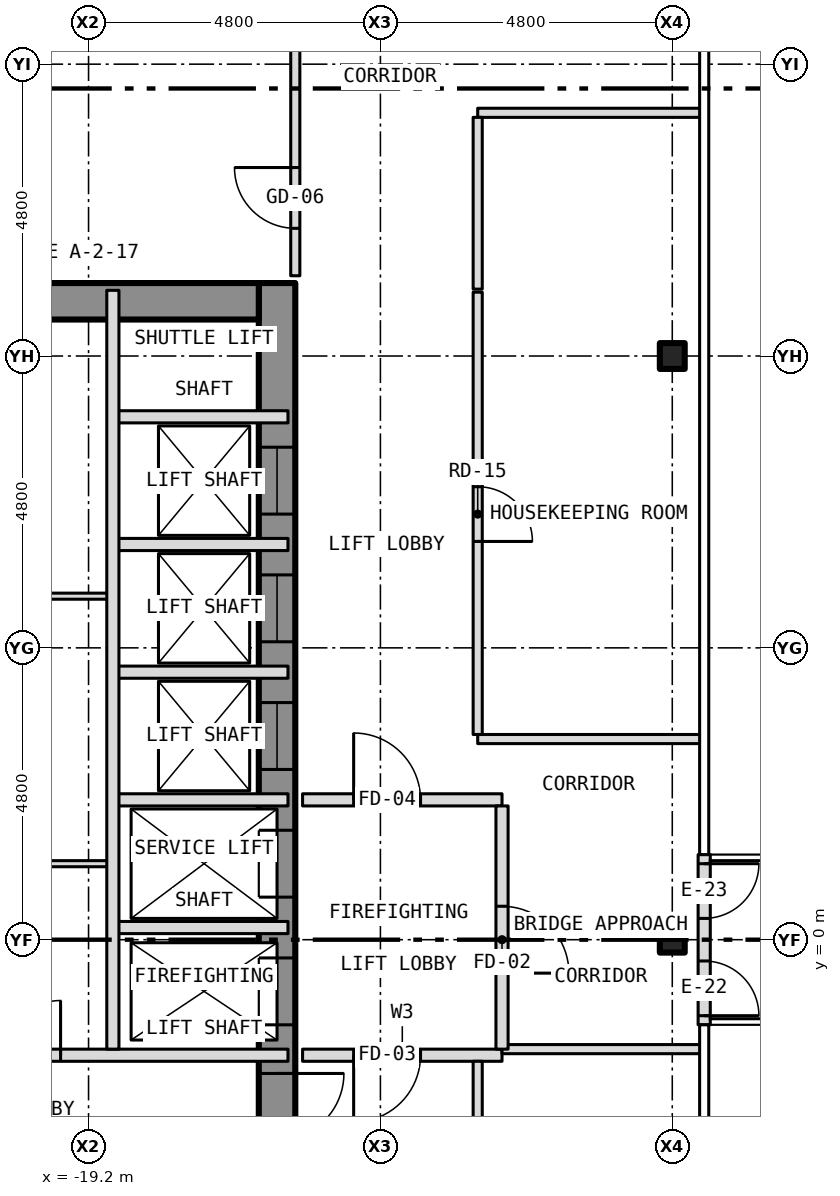
"""IFC4 building model, lengths in metres.
Left out: names, types, materials, properties, quantities, classifications, styles, units other than length and angle.
Written with IfcOpenShell. Run it as: python <this file> out.ifc"""

import sys

from ifc_helpers import new_model, si_unit, direction, frame, frame_2d, origin, origin_2d, place, context, subcontext, project, spatial, rectangle, i_section, extrude, element, fill, save


model = new_model("IFC4")
c1 = context("Model", 3, precision=1e-05, world=origin(), true_north=direction((0.0, 1.0)))
c2 = subcontext(c1, "Body", "Model", "MODEL_VIEW")
j1 = project(units=[si_unit("LENGTHUNIT", "METRE"), si_unit("PLANEANGLEUNIT", "RADIAN")], contexts=[c1])
p1 = place(None, origin())
s1 = spatial("IfcSite", under=j1, at=p1, CompositionType="ELEMENT")
p2 = place(p1, origin())
s2 = spatial("IfcBuilding", under=s1, at=p2, CompositionType="ELEMENT")
p3 = place(p2, frame((0.0, 0.0, 63.5)))
s3 = spatial("IfcBuildingStorey", under=s2, at=p3, CompositionType="ELEMENT", Elevation=63.5)
for number, where, z_axis, x_axis in (
    (1, (-9.6, 0.0, -0.15), (0.0, 0.0, 1.0), (1.0, 0.0, 0.0)),
    (2, (-9.6, 9.6, -0.15), (0.0, 0.0, 1.0), (1.0, 0.0, 0.0)),
):
    element("IfcColumn", number, at=place(p3, frame(where, z_axis=z_axis, x_axis=x_axis)), inside=s3, PredefinedType="COLUMN", context=c2, shape_type="SweptSolid", body=[
        extrude(i_section(OverallWidth=0.409, OverallDepth=0.424, WebThickness=0.033, FlangeThickness=0.052, at=origin_2d()), origin(), (0.0, 0.0, 1.0), 3.5),
    ])
p4 = place(p3, frame((-16.1, -10.8, 0.0), z_axis=(0.0, 0.0, 1.0), x_axis=(0.0, 1.0, 0.0)))
e3 = element("IfcWall", 3, at=p4, inside=s3, PredefinedType="SHEAR", context=c2, shape_type="SweptSolid", body=[
    extrude(rectangle(XDim=21.6, YDim=0.6, at=frame_2d((10.8, 0.0))), origin(), (0.0, 0.0, 1.0), 3.25),
])
p5 = place(p4, frame((9.4, 0.0, 0.0)))
e4 = element("IfcOpeningElement", 4, at=p5, cuts=e3, PredefinedType="OPENING", context=c2, shape_type="SweptSolid", body=[
    extrude(rectangle(XDim=1.1, YDim=2.1, at=frame_2d((0.55, 1.05))), frame((0.0, 0.312, 0.0), z_axis=(0.0, -1.0, 0.0), x_axis=(1.0, 0.0, 0.0)), (0.0, 0.0, 1.0), 0.624),
])
p6 = place(p4, frame((11.5, 0.0, 0.0)))
e5 = element("IfcOpeningElement", 5, at=p6, cuts=e3, PredefinedType="OPENING", context=c2, shape_type="SweptSolid", body=[
    extrude(rectangle(XDim=1.1, YDim=2.1, at=frame_2d((0.55, 1.05))), frame((0.0, 0.312, 0.0), z_axis=(0.0, -1.0, 0.0), x_axis=(1.0, 0.0, 0.0)), (0.0, 0.0, 1.0), 0.624),
])
p7 = place(p4, frame((13.6, 0.0, 0.0)))
e6 = element("IfcOpeningElement", 6, at=p7, cuts=e3, PredefinedType="OPENING", context=c2, shape_type="SweptSolid", body=[
    extrude(rectangle(XDim=1.1, YDim=2.1, at=frame_2d((0.55, 1.05))), frame((0.0, 0.312, 0.0), z_axis=(0.0, -1.0, 0.0), x_axis=(1.0, 0.0, 0.0)), (0.0, 0.0, 1.0), 0.624),
])
p8 = place(p4, frame((15.7, 0.0, 0.0)))
e7 = element("IfcOpeningElement", 7, at=p8, cuts=e3, PredefinedType="OPENING", context=c2, shape_type="SweptSolid", body=[
    extrude(rectangle(XDim=1.1, YDim=2.1, at=frame_2d((0.55, 1.05))), frame((0.0, 0.312, 0.0), z_axis=(0.0, -1.0, 0.0), x_axis=(1.0, 0.0, 0.0)), (0.0, 0.0, 1.0), 0.624),
])
p9 = place(p4, frame((17.8, 0.0, 0.0)))
e8 = element("IfcOpeningElement", 8, at=p9, cuts=e3, PredefinedType="OPENING", context=c2, shape_type="SweptSolid", body=[
    extrude(rectangle(XDim=1.1, YDim=2.1, at=frame_2d((0.55, 1.05))), frame((0.0, 0.312, 0.0), z_axis=(0.0, -1.0, 0.0), x_axis=(1.0, 0.0, 0.0)), (0.0, 0.0, 1.0), 0.624),
])
p10 = place(p4, frame((0.758, 0.0, 0.0)))
e9 = element("IfcOpeningElement", 9, at=p10, cuts=e3, PredefinedType="OPENING", context=c2, shape_type="SweptSolid", body=[
    extrude(rectangle(XDim=1.1, YDim=2.1, at=frame_2d((0.55, 1.05))), frame((0.0, 0.312, 0.0), z_axis=(0.0, -1.0, 0.0), x_axis=(1.0, 0.0, 0.0)), (0.0, 0.0, 1.0), 0.624),
])
p11 = place(p4, frame((7.5, 0.0, 0.0)))
e10 = element("IfcOpeningElement", 10, at=p11, cuts=e3, PredefinedType="OPENING", context=c2, shape_type="SweptSolid", body=[
    extrude(rectangle(XDim=1.1, YDim=2.1, at=frame_2d((0.55, 1.05))), frame((0.0, 0.312, 0.0), z_axis=(0.0, -1.0, 0.0), x_axis=(1.0, 0.0, 0.0)), (0.0, 0.0, 1.0), 0.624),
])
p12 = place(p3, frame((-23.4, 10.5, 0.0), z_axis=(0.0, 0.0, 1.0), x_axis=(1.0, 0.0, 0.0)))
e11 = element("IfcWall", 11, at=p12, inside=s3, PredefinedType="SHEAR", context=c2, shape_type="SweptSolid", body=[
    extrude(rectangle(XDim=7.0, YDim=0.6, at=frame_2d((3.5, 0.0))), origin(), (0.0, 0.0, 1.0), 3.25),
])
p13 = place(p3, frame((-9.075, -1.4, 0.0), z_axis=(0.0, 0.0, 1.0), x_axis=(0.0, 1.0, 0.0)))
e12 = element("IfcWall", 12, at=p13, inside=s3, PredefinedType="SOLIDWALL", context=c2, shape_type="SweptSolid", body=[
    extrude(rectangle(XDim=2.8, YDim=0.2, at=frame_2d((1.4, 0.0))), origin(), (0.0, 0.0, 1.0), 3.5),
])
p14 = place(p13, frame((0.15, 0.0, 0.0)))
e13 = element("IfcOpeningElement", 13, at=p14, cuts=e12, PredefinedType="OPENING", context=c2, shape_type="SweptSolid", body=[
    extrude(rectangle(XDim=0.9, YDim=2.1, at=frame_2d((0.45, 1.05))), frame((0.0, 0.112, 0.0), z_axis=(0.0, -1.0, 0.0), x_axis=(1.0, 0.0, 0.0)), (0.0, 0.0, 1.0), 0.224),
])
p15 = place(p13, frame((1.75, 0.0, 0.0)))
e14 = element("IfcOpeningElement", 14, at=p15, cuts=e12, PredefinedType="OPENING", context=c2, shape_type="SweptSolid", body=[
    extrude(rectangle(XDim=0.9, YDim=2.1, at=frame_2d((0.45, 1.05))), frame((0.0, 0.112, 0.0), z_axis=(0.0, -1.0, 0.0), x_axis=(1.0, 0.0, 0.0)), (0.0, 0.0, 1.0), 0.224),
])
p16 = place(p3, frame((-23.88, -1.9, 0.0), z_axis=(0.0, 0.0, 1.0), x_axis=(1.0, 0.0, 0.0)))
e15 = element("IfcWall", 15, at=p16, inside=s3, PredefinedType="PARTITIONING", context=c2, shape_type="SweptSolid", body=[
    extrude(rectangle(XDim=7.96, YDim=0.2, at=frame_2d((3.98, 0.0))), origin(), (0.0, 0.0, 1.0), 3.25),
])
p17 = place(p16, frame((3.32, 0.0, 0.0)))
e16 = element("IfcOpeningElement", 16, at=p17, cuts=e15, PredefinedType="OPENING", context=c2, shape_type="SweptSolid", body=[
    extrude(rectangle(XDim=0.9, YDim=2.1, at=frame_2d((0.45, 1.05))), frame((0.0, 0.112, 0.0), z_axis=(0.0, -1.0, 0.0), x_axis=(1.0, 0.0, 0.0)), (0.0, 0.0, 1.0), 0.224),
])
p18 = place(p3, frame((-15.68, -1.9, 0.0), z_axis=(0.0, 0.0, 1.0), x_axis=(1.0, 0.0, 0.0)))
e17 = element("IfcWall", 17, at=p18, inside=s3, PredefinedType="PARTITIONING", context=c2, shape_type="SweptSolid", body=[
    extrude(rectangle(XDim=3.28, YDim=0.2, at=frame_2d((1.64, 0.0))), origin(), (0.0, 0.0, 1.0), 3.35),
])
p19 = place(p18, frame((0.84, 0.0, 0.0)))
e18 = element("IfcOpeningElement", 18, at=p19, cuts=e17, PredefinedType="OPENING", context=c2, shape_type="SweptSolid", body=[
    extrude(rectangle(XDim=1.1, YDim=2.1, at=frame_2d((0.55, 1.05))), frame((0.0, 0.112, 0.0), z_axis=(0.0, -1.0, 0.0), x_axis=(1.0, 0.0, 0.0)), (0.0, 0.0, 1.0), 0.224),
])
p20 = place(p3, frame((-12.4, -1.8, 0.0), z_axis=(0.0, 0.0, 1.0), x_axis=(1.0, 0.0, 0.0)))
e19 = element("IfcWall", 19, at=p20, inside=s3, PredefinedType="PARTITIONING", context=c2, shape_type="SweptSolid", body=[
    extrude(rectangle(XDim=3.28, YDim=0.15, at=frame_2d((1.64, 0.0))), origin(), (0.0, 0.0, 1.0), 3.35),
])
p21 = place(p3, frame((-18.8, 0.2, 0.0), z_axis=(0.0, 0.0, 1.0), x_axis=(1.0, 0.0, 0.0)))
e20 = element("IfcWall", 20, at=p21, inside=s3, PredefinedType="PARTITIONING", context=c2, shape_type="SweptSolid", body=[
    extrude(rectangle(XDim=2.88, YDim=0.2, at=frame_2d((1.44, 0.0))), origin(), (0.0, 0.0, 1.0), 3.25),
])
p22 = place(p3, frame((-23.88, 1.25, 0.0), z_axis=(0.0, 0.0, 1.0), x_axis=(1.0, 0.0, 0.0)))
e21 = element("IfcWall", 21, at=p22, inside=s3, PredefinedType="PARTITIONING", context=c2, shape_type="SweptSolid", body=[
    extrude(rectangle(XDim=5.08, YDim=0.1, at=frame_2d((2.54, 0.0))), origin(), (0.0, 0.0, 1.0), 3.25),
])
p23 = place(p22, frame((2.03, 0.0, 0.0)))
e22 = element("IfcOpeningElement", 22, at=p23, cuts=e21, PredefinedType="OPENING", context=c2, shape_type="SweptSolid", body=[
    extrude(rectangle(XDim=0.9, YDim=2.1, at=frame_2d((0.45, 1.05))), frame((0.0, 0.062, 0.0), z_axis=(0.0, -1.0, 0.0), x_axis=(1.0, 0.0, 0.0)), (0.0, 0.0, 1.0), 0.124),
])
p24 = place(p3, frame((-18.8, 2.3, 0.0), z_axis=(0.0, 0.0, 1.0), x_axis=(1.0, 0.0, 0.0)))
e23 = element("IfcWall", 23, at=p24, inside=s3, PredefinedType="PARTITIONING", context=c2, shape_type="SweptSolid", body=[
    extrude(rectangle(XDim=2.88, YDim=0.2, at=frame_2d((1.44, 0.0))), origin(), (0.0, 0.0, 1.0), 3.25),
])
p25 = place(p3, frame((-15.68, 2.3, 0.0), z_axis=(0.0, 0.0, 1.0), x_axis=(1.0, 0.0, 0.0)))
e24 = element("IfcWall", 24, at=p25, inside=s3, PredefinedType="PARTITIONING", context=c2, shape_type="SweptSolid", body=[
    extrude(rectangle(XDim=3.28, YDim=0.2, at=frame_2d((1.64, 0.0))), origin(), (0.0, 0.0, 1.0), 3.35),
])
p26 = place(p25, frame((0.84, 0.0, 0.0)))
e25 = element("IfcOpeningElement", 25, at=p26, cuts=e24, PredefinedType="OPENING", context=c2, shape_type="SweptSolid", body=[
    extrude(rectangle(XDim=1.1, YDim=2.1, at=frame_2d((0.55, 1.05))), frame((0.0, 0.112, 0.0), z_axis=(0.0, -1.0, 0.0), x_axis=(1.0, 0.0, 0.0)), (0.0, 0.0, 1.0), 0.224),
])
p27 = place(p3, frame((-12.8, 3.3, 0.0), z_axis=(0.0, 0.0, 1.0), x_axis=(1.0, 0.0, 0.0)))
e26 = element("IfcWall", 26, at=p27, inside=s3, PredefinedType="PARTITIONING", context=c2, shape_type="SweptSolid", body=[
    extrude(rectangle(XDim=3.68, YDim=0.15, at=frame_2d((1.84, 0.0))), origin(), (0.0, 0.0, 1.0), 3.35),
])
p28 = place(p3, frame((-18.8, 4.4, 0.0), z_axis=(0.0, 0.0, 1.0), x_axis=(1.0, 0.0, 0.0)))
e27 = element("IfcWall", 27, at=p28, inside=s3, PredefinedType="PARTITIONING", context=c2, shape_type="SweptSolid", body=[
    extrude(rectangle(XDim=2.88, YDim=0.2, at=frame_2d((1.44, 0.0))), origin(), (0.0, 0.0, 1.0), 3.25),
])
p29 = place(p3, frame((-23.88, 5.65, 0.0), z_axis=(0.0, 0.0, 1.0), x_axis=(1.0, 0.0, 0.0)))
e28 = element("IfcWall", 28, at=p29, inside=s3, PredefinedType="PARTITIONING", context=c2, shape_type="SweptSolid", body=[
    extrude(rectangle(XDim=5.08, YDim=0.1, at=frame_2d((2.54, 0.0))), origin(), (0.0, 0.0, 1.0), 3.25),
])
p30 = place(p29, frame((2.03, 0.0, 0.0)))
e29 = element("IfcOpeningElement", 29, at=p30, cuts=e28, PredefinedType="OPENING", context=c2, shape_type="SweptSolid", body=[
    extrude(rectangle(XDim=0.9, YDim=2.1, at=frame_2d((0.45, 1.05))), frame((0.0, 0.062, 0.0), z_axis=(0.0, -1.0, 0.0), x_axis=(1.0, 0.0, 0.0)), (0.0, 0.0, 1.0), 0.124),
])
for number, where, z_axis, x_axis in (
    (30, (-18.8, 6.5, 0.0), (0.0, 0.0, 1.0), (1.0, 0.0, 0.0)),
    (31, (-18.8, 8.6, 0.0), (0.0, 0.0, 1.0), (1.0, 0.0, 0.0)),
):
    element("IfcWall", number, at=place(p3, frame(where, z_axis=z_axis, x_axis=x_axis)), inside=s3, PredefinedType="PARTITIONING", context=c2, shape_type="SweptSolid", body=[
        extrude(rectangle(XDim=2.88, YDim=0.2, at=frame_2d((1.44, 0.0))), origin(), (0.0, 0.0, 1.0), 3.25),
    ])
p31 = place(p3, frame((-12.8, 13.6, 0.0), z_axis=(0.0, 0.0, 1.0), x_axis=(1.0, 0.0, 0.0)))
e32 = element("IfcWall", 32, at=p31, inside=s3, PredefinedType="PARTITIONING", context=c2, shape_type="SweptSolid", body=[
    extrude(rectangle(XDim=3.68, YDim=0.15, at=frame_2d((1.84, 0.0))), origin(), (0.0, 0.0, 1.0), 3.35),
])
p32 = place(p3, frame((-18.8, -1.8, 0.0), z_axis=(0.0, 0.0, 1.0), x_axis=(0.0, 1.0, 0.0)))
e33 = element("IfcWall", 33, at=p32, inside=s3, PredefinedType="PARTITIONING", context=c2, shape_type="SweptSolid", body=[
    extrude(rectangle(XDim=12.48, YDim=0.2, at=frame_2d((6.24, 0.0))), origin(), (0.0, 0.0, 1.0), 3.25),
])
p33 = place(p3, frame((-15.8, 10.92, 0.0), z_axis=(0.0, 0.0, 1.0), x_axis=(0.0, 1.0, 0.0)))
e34 = element("IfcWall", 34, at=p33, inside=s3, PredefinedType="PARTITIONING", context=c2, shape_type="SweptSolid", body=[
    extrude(rectangle(XDim=4.805, YDim=0.15, at=frame_2d((2.403, 0.0))), origin(), (0.0, 0.0, 1.0), 3.35),
])
p34 = place(p33, frame((0.78, 0.0, 0.0)))
e35 = element("IfcOpeningElement", 35, at=p34, cuts=e34, PredefinedType="OPENING", context=c2, shape_type="SweptSolid", body=[
    extrude(rectangle(XDim=1.0, YDim=2.1, at=frame_2d((0.5, 1.05))), frame((0.0, 0.087, 0.0), z_axis=(0.0, -1.0, 0.0), x_axis=(1.0, 0.0, 0.0)), (0.0, 0.0, 1.0), 0.174),
])
p35 = place(p3, frame((-12.8, -13.525, 0.0), z_axis=(0.0, 0.0, 1.0), x_axis=(0.0, 1.0, 0.0)))
e36 = element("IfcWall", 36, at=p35, inside=s3, PredefinedType="PARTITIONING", context=c2, shape_type="SweptSolid", body=[
    extrude(rectangle(XDim=11.525, YDim=0.15, at=frame_2d((5.762, 0.0))), origin(), (0.0, 0.0, 1.0), 3.35),
])
p36 = place(p35, frame((6.725, 0.0, 0.0)))
e37 = element("IfcOpeningElement", 37, at=p36, cuts=e36, PredefinedType="OPENING", context=c2, shape_type="SweptSolid", body=[
    extrude(rectangle(XDim=0.9, YDim=2.1, at=frame_2d((0.45, 1.05))), frame((0.0, 0.087, 0.0), z_axis=(0.0, -1.0, 0.0), x_axis=(1.0, 0.0, 0.0)), (0.0, 0.0, 1.0), 0.174),
])
p37 = place(p3, frame((-12.8, 3.375, 0.0), z_axis=(0.0, 0.0, 1.0), x_axis=(0.0, 1.0, 0.0)))
e38 = element("IfcWall", 38, at=p37, inside=s3, PredefinedType="PARTITIONING", context=c2, shape_type="SweptSolid", body=[
    extrude(rectangle(XDim=7.275, YDim=0.15, at=frame_2d((3.637, 0.0))), origin(), (0.0, 0.0, 1.0), 3.35),
])
p38 = place(p37, frame((3.175, 0.0, 0.0)))
e39 = element("IfcOpeningElement", 39, at=p38, cuts=e38, PredefinedType="OPENING", context=c2, shape_type="SweptSolid", body=[
    extrude(rectangle(XDim=0.9, YDim=2.1, at=frame_2d((0.45, 1.05))), frame((0.0, 0.087, 0.0), z_axis=(0.0, -1.0, 0.0), x_axis=(1.0, 0.0, 0.0)), (0.0, 0.0, 1.0), 0.174),
])
p39 = place(p3, frame((-12.8, 10.7, 0.0), z_axis=(0.0, 0.0, 1.0), x_axis=(0.0, 1.0, 0.0)))
e40 = element("IfcWall", 40, at=p39, inside=s3, PredefinedType="PARTITIONING", context=c2, shape_type="SweptSolid", body=[
    extrude(rectangle(XDim=2.825, YDim=0.15, at=frame_2d((1.413, 0.0))), origin(), (0.0, 0.0, 1.0), 3.35),
])
p40 = place(p3, frame((-12.4, -1.8, 0.0), z_axis=(0.0, 0.0, 1.0), x_axis=(0.0, 1.0, 0.0)))
e41 = element("IfcWall", 41, at=p40, inside=s3, PredefinedType="PARTITIONING", context=c2, shape_type="SweptSolid", body=[
    extrude(rectangle(XDim=4.0, YDim=0.2, at=frame_2d((2.0, 0.0))), origin(), (0.0, 0.0, 1.0), 3.35),
])
p41 = place(p40, frame((1.25, 0.0, 0.0)))
e42 = element("IfcOpeningElement", 42, at=p41, cuts=e41, PredefinedType="OPENING", context=c2, shape_type="SweptSolid", body=[
    extrude(rectangle(XDim=1.1, YDim=2.1, at=frame_2d((0.55, 1.05))), frame((0.0, 0.112, 0.0), z_axis=(0.0, -1.0, 0.0), x_axis=(1.0, 0.0, 0.0)), (0.0, 0.0, 1.0), 0.224),
])
p42 = place(p14, origin())
e43 = element("IfcDoor", 43, at=p42, inside=s3, OperationType="SINGLE_SWING_LEFT", PredefinedType="DOOR", context=c2, shape_type="SweptSolid", body=[
    extrude(rectangle(XDim=0.9, YDim=2.1, at=frame_2d((0.45, 1.05))), frame((0.0, 0.025, 0.0), z_axis=(0.0, -1.0, 0.0), x_axis=(1.0, 0.0, 0.0)), (0.0, 0.0, 1.0), 0.05),
])
fill(e13, e43)
p43 = place(p15, origin())
e44 = element("IfcDoor", 44, at=p43, inside=s3, OperationType="SINGLE_SWING_RIGHT", PredefinedType="DOOR", context=c2, shape_type="SweptSolid", body=[
    extrude(rectangle(XDim=0.9, YDim=2.1, at=frame_2d((0.45, 1.05))), frame((0.0, 0.025, 0.0), z_axis=(0.0, -1.0, 0.0), x_axis=(1.0, 0.0, 0.0)), (0.0, 0.0, 1.0), 0.05),
])
fill(e14, e44)
p44 = place(p5, origin())
e45 = element("IfcDoor", 45, at=p44, inside=s3, OperationType="SLIDING_TO_LEFT", PredefinedType="DOOR", context=c2, shape_type="SweptSolid", body=[
    extrude(rectangle(XDim=1.1, YDim=2.1, at=frame_2d((0.55, 1.05))), frame((0.0, 0.025, 0.0), z_axis=(0.0, -1.0, 0.0), x_axis=(1.0, 0.0, 0.0)), (0.0, 0.0, 1.0), 0.05),
])
fill(e4, e45)
p45 = place(p6, origin())
e46 = element("IfcDoor", 46, at=p45, inside=s3, OperationType="SLIDING_TO_LEFT", PredefinedType="DOOR", context=c2, shape_type="SweptSolid", body=[
    extrude(rectangle(XDim=1.1, YDim=2.1, at=frame_2d((0.55, 1.05))), frame((0.0, 0.025, 0.0), z_axis=(0.0, -1.0, 0.0), x_axis=(1.0, 0.0, 0.0)), (0.0, 0.0, 1.0), 0.05),
])
fill(e5, e46)
p46 = place(p7, origin())
e47 = element("IfcDoor", 47, at=p46, inside=s3, OperationType="SLIDING_TO_LEFT", PredefinedType="DOOR", context=c2, shape_type="SweptSolid", body=[
    extrude(rectangle(XDim=1.1, YDim=2.1, at=frame_2d((0.55, 1.05))), frame((0.0, 0.025, 0.0), z_axis=(0.0, -1.0, 0.0), x_axis=(1.0, 0.0, 0.0)), (0.0, 0.0, 1.0), 0.05),
])
fill(e6, e47)
p47 = place(p8, origin())
e48 = element("IfcDoor", 48, at=p47, inside=s3, OperationType="SLIDING_TO_LEFT", PredefinedType="DOOR", context=c2, shape_type="SweptSolid", body=[
    extrude(rectangle(XDim=1.1, YDim=2.1, at=frame_2d((0.55, 1.05))), frame((0.0, 0.025, 0.0), z_axis=(0.0, -1.0, 0.0), x_axis=(1.0, 0.0, 0.0)), (0.0, 0.0, 1.0), 0.05),
])
fill(e7, e48)
p48 = place(p9, origin())
e49 = element("IfcDoor", 49, at=p48, inside=s3, OperationType="SLIDING_TO_LEFT", PredefinedType="DOOR", context=c2, shape_type="SweptSolid", body=[
    extrude(rectangle(XDim=1.1, YDim=2.1, at=frame_2d((0.55, 1.05))), frame((0.0, 0.025, 0.0), z_axis=(0.0, -1.0, 0.0), x_axis=(1.0, 0.0, 0.0)), (0.0, 0.0, 1.0), 0.05),
])
fill(e8, e49)
p49 = place(p11, origin())
e50 = element("IfcDoor", 50, at=p49, inside=s3, OperationType="SINGLE_SWING_RIGHT", PredefinedType="DOOR", context=c2, shape_type="SweptSolid", body=[
    extrude(rectangle(XDim=1.1, YDim=2.1, at=frame_2d((0.55, 1.05))), frame((0.0, 0.025, 0.0), z_axis=(0.0, -1.0, 0.0), x_axis=(1.0, 0.0, 0.0)), (0.0, 0.0, 1.0), 0.05),
])
fill(e10, e50)
p50 = place(p17, origin())
e51 = element("IfcDoor", 51, at=p50, inside=s3, OperationType="SINGLE_SWING_RIGHT", PredefinedType="DOOR", context=c2, shape_type="SweptSolid", body=[
    extrude(rectangle(XDim=0.9, YDim=2.1, at=frame_2d((0.45, 1.05))), frame((0.0, 0.025, 0.0), z_axis=(0.0, -1.0, 0.0), x_axis=(1.0, 0.0, 0.0)), (0.0, 0.0, 1.0), 0.05),
])
fill(e16, e51)
p51 = place(p41, origin())
e52 = element("IfcDoor", 52, at=p51, inside=s3, OperationType="SINGLE_SWING_LEFT", PredefinedType="DOOR", context=c2, shape_type="SweptSolid", body=[
    extrude(rectangle(XDim=1.1, YDim=2.1, at=frame_2d((0.55, 1.05))), frame((0.0, 0.025, 0.0), z_axis=(0.0, -1.0, 0.0), x_axis=(1.0, 0.0, 0.0)), (0.0, 0.0, 1.0), 0.05),
])
fill(e42, e52)
p52 = place(p19, origin())
e53 = element("IfcDoor", 53, at=p52, inside=s3, OperationType="SINGLE_SWING_LEFT", PredefinedType="DOOR", context=c2, shape_type="SweptSolid", body=[
    extrude(rectangle(XDim=1.1, YDim=2.1, at=frame_2d((0.55, 1.05))), frame((0.0, 0.025, 0.0), z_axis=(0.0, -1.0, 0.0), x_axis=(1.0, 0.0, 0.0)), (0.0, 0.0, 1.0), 0.05),
])
fill(e18, e53)
p53 = place(p26, origin())
e54 = element("IfcDoor", 54, at=p53, inside=s3, OperationType="SINGLE_SWING_LEFT", PredefinedType="DOOR", context=c2, shape_type="SweptSolid", body=[
    extrude(rectangle(XDim=1.1, YDim=2.1, at=frame_2d((0.55, 1.05))), frame((0.0, 0.025, 0.0), z_axis=(0.0, -1.0, 0.0), x_axis=(1.0, 0.0, 0.0)), (0.0, 0.0, 1.0), 0.05),
])
fill(e25, e54)
p54 = place(p34, origin())
e55 = element("IfcDoor", 55, at=p54, inside=s3, OperationType="SINGLE_SWING_RIGHT", PredefinedType="DOOR", context=c2, shape_type="SweptSolid", body=[
    extrude(rectangle(XDim=1.0, YDim=2.1, at=frame_2d((0.5, 1.05))), frame((0.0, 0.025, 0.0), z_axis=(0.0, -1.0, 0.0), x_axis=(1.0, 0.0, 0.0)), (0.0, 0.0, 1.0), 0.05),
])
fill(e35, e55)
p55 = place(p38, origin())
e56 = element("IfcDoor", 56, at=p55, inside=s3, OperationType="SINGLE_SWING_LEFT", PredefinedType="DOOR", context=c2, shape_type="SweptSolid", body=[
    extrude(rectangle(XDim=0.9, YDim=2.1, at=frame_2d((0.45, 1.05))), frame((0.0, 0.025, 0.0), z_axis=(0.0, -1.0, 0.0), x_axis=(1.0, 0.0, 0.0)), (0.0, 0.0, 1.0), 0.05),
])
fill(e39, e56)
save(model, sys.argv[1])
